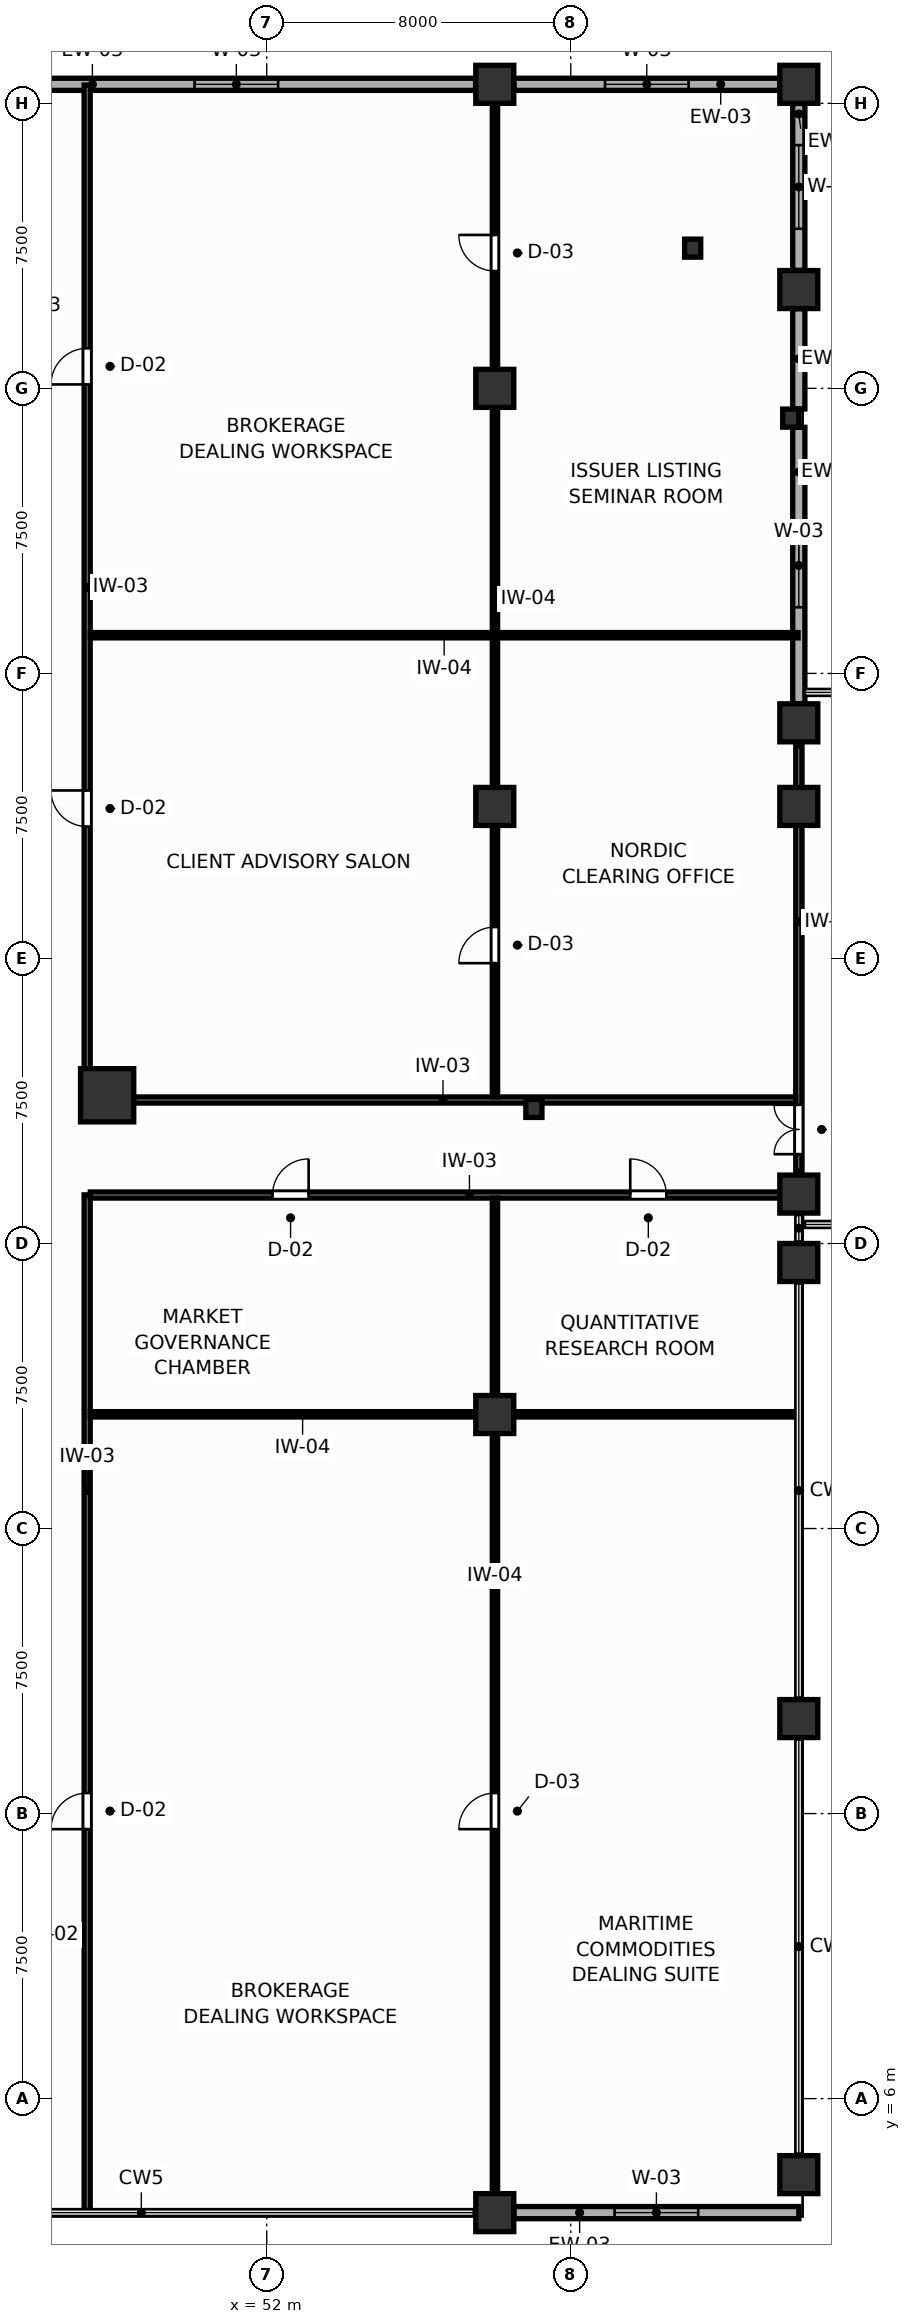
"""IFC4 building model, lengths in metres.
Left out: names, types, materials, properties, quantities, classifications, styles, units other than length and angle.
Written with IfcOpenShell. Run it as: python <this file> out.ifc"""

import sys

from ifc_helpers import new_model, si_unit, direction, frame, frame_2d, origin, origin_2d, place, context, subcontext, project, spatial, rectangle, i_section, extrude, source, transform, mapped, element, fill, save


model = new_model("IFC4")
c1 = context("Model", 3, precision=1e-05, world=origin(), true_north=direction((0.0, 1.0)))
c2 = subcontext(c1, "Body", "Model", "MODEL_VIEW")
j1 = project(units=[si_unit("LENGTHUNIT", "METRE"), si_unit("PLANEANGLEUNIT", "RADIAN")], contexts=[c1])
p1 = place(None, origin())
s1 = spatial("IfcSite", under=j1, at=p1, CompositionType="ELEMENT")
p2 = place(p1, origin())
s2 = spatial("IfcBuilding", under=s1, at=p2, CompositionType="ELEMENT")
p3 = place(p2, frame((0.0, 0.0, 4.8)))
s3 = spatial("IfcBuildingStorey", under=s2, at=p3, CompositionType="ELEMENT", Elevation=4.8)
m1 = source(origin(), c2, "Body", "SweptSolid", [
    extrude(rectangle(XDim=1.4, YDim=1.4, at=origin_2d()), origin(), (0.0, 0.0, 1.0), 4.8),
])
p4 = place(p3, frame((47.8, 32.4, 0.0), z_axis=(0.0, 0.0, 1.0), x_axis=(1.0, 0.0, 0.0)))
e1 = element("IfcColumn", 1, at=p4, inside=s3, PredefinedType="COLUMN", context=c2, shape_type="MappedRepresentation", body=[
    mapped(m1, transform((0.0, 0.0, 0.0), scale=1.0)),
])
m2 = source(origin(), c2, "Body", "SweptSolid", [
    extrude(rectangle(XDim=1.0, YDim=1.0, at=origin_2d()), origin(), (0.0, 0.0, 1.0), 4.8),
])
for number, where, z_axis, x_axis in (
    (2, (66.0, 4.0, 0.0), (0.0, 0.0, 1.0), (1.0, 0.0, 0.0)),
    (3, (66.0, 16.0, 0.0), (0.0, 0.0, 1.0), (1.0, 0.0, 0.0)),
    (4, (66.0, 28.0, 0.0), (0.0, 0.0, 1.0), (1.0, 0.0, 0.0)),
    (5, (66.0, 40.0, 0.0), (0.0, 0.0, 1.0), (1.0, 0.0, 0.0)),
    (6, (66.0, 53.6, 0.0), (0.0, 0.0, 1.0), (1.0, 0.0, 0.0)),
    (7, (66.0, 59.0, 0.0), (0.0, 0.0, 1.0), (1.0, 0.0, 0.0)),
    (8, (58.0, 3.0, 0.0), (0.0, 0.0, 1.0), (1.0, 0.0, 0.0)),
    (9, (58.0, 59.0, 0.0), (0.0, 0.0, 1.0), (1.0, 0.0, 0.0)),
    (10, (58.0, 24.0, 0.0), (0.0, 0.0, 1.0), (1.0, 0.0, 0.0)),
    (11, (58.0, 40.0, 0.0), (0.0, 0.0, 1.0), (1.0, 0.0, 0.0)),
    (12, (58.0, 51.0, 0.0), (0.0, 0.0, 1.0), (1.0, 0.0, 0.0)),
    (13, (66.0, 29.8, 0.0), (0.0, 0.0, 1.0), (1.0, 0.0, 0.0)),
    (14, (66.0, 42.2, 0.0), (0.0, 0.0, 1.0), (1.0, 0.0, 0.0)),
):
    element("IfcColumn", number, at=place(p3, frame(where, z_axis=z_axis, x_axis=x_axis)), inside=s3, PredefinedType="COLUMN", context=c2, shape_type="MappedRepresentation", body=[
        mapped(m2, transform((0.0, 0.0, 0.0), scale=1.0)),
    ])
m3 = source(origin(), c2, "Body", "SweptSolid", [
    extrude(i_section(OverallWidth=0.424, OverallDepth=0.474, WebThickness=0.045, FlangeThickness=0.072, FilletRadius=0.015, at=origin_2d()), origin(), (0.0, 0.0, 1.0), 4.8),
])
for number, where, z_axis, x_axis in (
    (15, (65.789, 50.217, 0.0), (0.0, 0.0, 1.0), (1.0, 0.0, 0.0)),
    (16, (63.207, 54.689, 0.0), (0.0, 0.0, 1.0), (1.0, 0.0, 0.0)),
    (17, (59.03, 32.054, 0.0), (0.0, 0.0, 1.0), (1.0, 0.0, 0.0)),
):
    element("IfcColumn", number, at=place(p3, frame(where, z_axis=z_axis, x_axis=x_axis)), inside=s3, PredefinedType="COLUMN", context=c2, shape_type="MappedRepresentation", body=[
        mapped(m3, transform((0.0, 0.0, 0.0), scale=1.0)),
    ])
p5 = place(p3, frame((58.505, 3.0, 0.0), z_axis=(0.0, 0.0, 1.0), x_axis=(1.0, 0.0, 0.0)))
e18 = element("IfcWall", 18, at=p5, inside=s3, PredefinedType="SOLIDWALL", context=c2, shape_type="SweptSolid", body=[
    extrude(rectangle(XDim=7.495, YDim=0.32, at=frame_2d((3.748, 0.0))), origin(), (0.0, 0.0, 1.0), 3.82),
])
p6 = place(p5, frame((2.647, 0.0, 0.75)))
e19 = element("IfcOpeningElement", 19, at=p6, cuts=e18, PredefinedType="OPENING", context=c2, shape_type="SweptSolid", body=[
    extrude(rectangle(XDim=2.2, YDim=2.0, at=frame_2d((1.1, 1.0))), frame((0.0, 0.17, 0.0), z_axis=(0.0, -1.0, 0.0), x_axis=(1.0, 0.0, 0.0)), (0.0, 0.0, 1.0), 0.34),
])
p7 = place(p3, frame((44.905, 59.0, 0.0), z_axis=(0.0, 0.0, 1.0), x_axis=(1.0, 0.0, 0.0)))
e20 = element("IfcWall", 20, at=p7, inside=s3, PredefinedType="SOLIDWALL", context=c2, shape_type="SweptSolid", body=[
    extrude(rectangle(XDim=12.59, YDim=0.32, at=frame_2d((6.295, 0.0))), origin(), (0.0, 0.0, 1.0), 3.82),
])
p8 = place(p7, frame((5.195, 0.0, 0.75)))
e21 = element("IfcOpeningElement", 21, at=p8, cuts=e20, PredefinedType="OPENING", context=c2, shape_type="SweptSolid", body=[
    extrude(rectangle(XDim=2.2, YDim=2.0, at=frame_2d((1.1, 1.0))), frame((0.0, 0.17, 0.0), z_axis=(0.0, -1.0, 0.0), x_axis=(1.0, 0.0, 0.0)), (0.0, 0.0, 1.0), 0.34),
])
p9 = place(p3, frame((58.505, 59.0, 0.0), z_axis=(0.0, 0.0, 1.0), x_axis=(1.0, 0.0, 0.0)))
e22 = element("IfcWall", 22, at=p9, inside=s3, PredefinedType="SOLIDWALL", context=c2, shape_type="SweptSolid", body=[
    extrude(rectangle(XDim=6.99, YDim=0.32, at=frame_2d((3.495, 0.0))), origin(), (0.0, 0.0, 1.0), 3.82),
])
p10 = place(p9, frame((2.395, 0.0, 0.75)))
e23 = element("IfcOpeningElement", 23, at=p10, cuts=e22, PredefinedType="OPENING", context=c2, shape_type="SweptSolid", body=[
    extrude(rectangle(XDim=2.2, YDim=2.0, at=frame_2d((1.1, 1.0))), frame((0.0, 0.17, 0.0), z_axis=(0.0, -1.0, 0.0), x_axis=(1.0, 0.0, 0.0)), (0.0, 0.0, 1.0), 0.34),
])
p11 = place(p3, frame((66.0, 42.705, 0.0), z_axis=(0.0, 0.0, 1.0), x_axis=(0.0, 1.0, 0.0)))
e24 = element("IfcWall", 24, at=p11, inside=s3, PredefinedType="SOLIDWALL", context=c2, shape_type="SweptSolid", body=[
    extrude(rectangle(XDim=7.27, YDim=0.32, at=frame_2d((3.635, 0.0))), origin(), (0.0, 0.0, 1.0), 3.82),
])
p12 = place(p11, frame((2.535, 0.0, 0.75)))
e25 = element("IfcOpeningElement", 25, at=p12, cuts=e24, PredefinedType="OPENING", context=c2, shape_type="SweptSolid", body=[
    extrude(rectangle(XDim=2.2, YDim=2.0, at=frame_2d((1.1, 1.0))), frame((0.0, 0.17, 0.0), z_axis=(0.0, -1.0, 0.0), x_axis=(1.0, 0.0, 0.0)), (0.0, 0.0, 1.0), 0.34),
])
p13 = place(p3, frame((66.0, 50.459, 0.0), z_axis=(0.0, 0.0, 1.0), x_axis=(0.0, 1.0, 0.0)))
e26 = element("IfcWall", 26, at=p13, inside=s3, PredefinedType="SOLIDWALL", context=c2, shape_type="SweptSolid", body=[
    extrude(rectangle(XDim=2.636, YDim=0.32, at=frame_2d((1.318, 0.0))), origin(), (0.0, 0.0, 1.0), 3.82),
])
p14 = place(p3, frame((66.0, 54.105, 0.0), z_axis=(0.0, 0.0, 1.0), x_axis=(0.0, 1.0, 0.0)))
e27 = element("IfcWall", 27, at=p14, inside=s3, PredefinedType="SOLIDWALL", context=c2, shape_type="SweptSolid", body=[
    extrude(rectangle(XDim=4.39, YDim=0.32, at=frame_2d((2.195, 0.0))), origin(), (0.0, 0.0, 1.0), 3.82),
])
p15 = place(p14, frame((1.095, 0.0, 0.75)))
e28 = element("IfcOpeningElement", 28, at=p15, cuts=e27, PredefinedType="OPENING", context=c2, shape_type="SweptSolid", body=[
    extrude(rectangle(XDim=2.2, YDim=2.0, at=frame_2d((1.1, 1.0))), frame((0.0, 0.17, 0.0), z_axis=(0.0, -1.0, 0.0), x_axis=(1.0, 0.0, 0.0)), (0.0, 0.0, 1.0), 0.34),
])
p16 = place(p3, frame((66.0, 30.4, 0.0), z_axis=(0.0, 0.0, 1.0), x_axis=(0.0, 1.0, 0.0)))
e29 = element("IfcWall", 29, at=p16, inside=s3, PredefinedType="PARTITIONING", context=c2, shape_type="SweptSolid", body=[
    extrude(rectangle(XDim=11.2, YDim=0.16, at=frame_2d((5.6, 0.0))), origin(), (0.0, 0.0, 1.0), 3.82),
])
p17 = place(p16, frame((0.45, 0.0, 0.0)))
e30 = element("IfcOpeningElement", 30, at=p17, cuts=e29, PredefinedType="OPENING", context=c2, shape_type="SweptSolid", body=[
    extrude(rectangle(XDim=1.3, YDim=2.1, at=frame_2d((0.65, 1.05))), frame((0.0, 0.09, 0.0), z_axis=(0.0, -1.0, 0.0), x_axis=(1.0, 0.0, 0.0)), (0.0, 0.0, 1.0), 0.18),
])
p18 = place(p3, frame((47.275, 3.02, 0.0), z_axis=(0.0, 0.0, 1.0), x_axis=(0.0, 1.0, 0.0)))
e31 = element("IfcWall", 31, at=p18, inside=s3, PredefinedType="PARTITIONING", context=c2, shape_type="SweptSolid", body=[
    extrude(rectangle(XDim=26.76, YDim=0.16, at=frame_2d((13.38, 0.0))), origin(), (0.0, 0.0, 1.0), 4.52),
])
p19 = place(p18, frame((10.07, 0.0, 0.0)))
e32 = element("IfcOpeningElement", 32, at=p19, cuts=e31, PredefinedType="OPENING", context=c2, shape_type="SweptSolid", body=[
    extrude(rectangle(XDim=0.95, YDim=2.05, at=frame_2d((0.475, 1.025))), frame((0.0, 0.09, 0.0), z_axis=(0.0, -1.0, 0.0), x_axis=(1.0, 0.0, 0.0)), (0.0, 0.0, 1.0), 0.18),
])
p20 = place(p3, frame((47.275, 32.27, 0.0), z_axis=(0.0, 0.0, 1.0), x_axis=(0.0, 1.0, 0.0)))
e33 = element("IfcWall", 33, at=p20, inside=s3, PredefinedType="PARTITIONING", context=c2, shape_type="SweptSolid", body=[
    extrude(rectangle(XDim=26.71, YDim=0.16, at=frame_2d((13.355, 0.0))), origin(), (0.0, 0.0, 1.0), 4.52),
])
p21 = place(p20, frame((7.2, 0.0, 0.0)))
e34 = element("IfcOpeningElement", 34, at=p21, cuts=e33, PredefinedType="OPENING", context=c2, shape_type="SweptSolid", body=[
    extrude(rectangle(XDim=0.95, YDim=2.05, at=frame_2d((0.475, 1.025))), frame((0.0, 0.09, 0.0), z_axis=(0.0, -1.0, 0.0), x_axis=(1.0, 0.0, 0.0)), (0.0, 0.0, 1.0), 0.18),
])
p22 = place(p20, frame((18.833, 0.0, 0.0)))
e35 = element("IfcOpeningElement", 35, at=p22, cuts=e33, PredefinedType="OPENING", context=c2, shape_type="SweptSolid", body=[
    extrude(rectangle(XDim=0.95, YDim=2.05, at=frame_2d((0.475, 1.025))), frame((0.0, 0.09, 0.0), z_axis=(0.0, -1.0, 0.0), x_axis=(1.0, 0.0, 0.0)), (0.0, 0.0, 1.0), 0.18),
])
p23 = place(p3, frame((47.357, 29.775, 0.0), z_axis=(0.0, 0.0, 1.0), x_axis=(1.0, 0.0, 0.0)))
e36 = element("IfcWall", 36, at=p23, inside=s3, PredefinedType="PARTITIONING", context=c2, shape_type="SweptSolid", body=[
    extrude(rectangle(XDim=18.623, YDim=0.16, at=frame_2d((9.312, 0.0))), origin(), (0.0, 0.0, 1.0), 4.52),
])
p24 = place(p23, frame((4.795, 0.0, 0.0)))
e37 = element("IfcOpeningElement", 37, at=p24, cuts=e36, PredefinedType="OPENING", context=c2, shape_type="SweptSolid", body=[
    extrude(rectangle(XDim=0.95, YDim=2.05, at=frame_2d((0.475, 1.025))), frame((0.0, 0.09, 0.0), z_axis=(0.0, -1.0, 0.0), x_axis=(1.0, 0.0, 0.0)), (0.0, 0.0, 1.0), 0.18),
])
p25 = place(p23, frame((14.208, 0.0, 0.0)))
e38 = element("IfcOpeningElement", 38, at=p25, cuts=e36, PredefinedType="OPENING", context=c2, shape_type="SweptSolid", body=[
    extrude(rectangle(XDim=0.95, YDim=2.05, at=frame_2d((0.475, 1.025))), frame((0.0, 0.09, 0.0), z_axis=(0.0, -1.0, 0.0), x_axis=(1.0, 0.0, 0.0)), (0.0, 0.0, 1.0), 0.18),
])
p26 = place(p3, frame((47.357, 32.275, 0.0), z_axis=(0.0, 0.0, 1.0), x_axis=(1.0, 0.0, 0.0)))
e39 = element("IfcWall", 39, at=p26, inside=s3, PredefinedType="PARTITIONING", context=c2, shape_type="SweptSolid", body=[
    extrude(rectangle(XDim=18.561, YDim=0.16, at=frame_2d((9.281, 0.0))), origin(), (0.0, 0.0, 1.0), 3.82),
])
p27 = place(p3, frame((58.005, 3.02, 0.0), z_axis=(0.0, 0.0, 1.0), x_axis=(0.0, 1.0, 0.0)))
e40 = element("IfcWall", 40, at=p27, inside=s3, PredefinedType="PARTITIONING", context=c2, shape_type="SweptSolid", body=[
    extrude(rectangle(XDim=26.673, YDim=0.14, at=frame_2d((13.336, 0.0))), origin(), (0.0, 0.0, 1.0), 3.82),
])
p28 = place(p27, frame((10.07, 0.0, 0.0)))
e41 = element("IfcOpeningElement", 41, at=p28, cuts=e40, PredefinedType="OPENING", context=c2, shape_type="SweptSolid", body=[
    extrude(rectangle(XDim=0.95, YDim=2.05, at=frame_2d((0.475, 1.025))), frame((0.0, 0.08, 0.0), z_axis=(0.0, -1.0, 0.0), x_axis=(1.0, 0.0, 0.0)), (0.0, 0.0, 1.0), 0.16),
])
p29 = place(p3, frame((58.005, 32.357, 0.0), z_axis=(0.0, 0.0, 1.0), x_axis=(0.0, 1.0, 0.0)))
e42 = element("IfcWall", 42, at=p29, inside=s3, PredefinedType="PARTITIONING", context=c2, shape_type="SweptSolid", body=[
    extrude(rectangle(XDim=26.623, YDim=0.14, at=frame_2d((13.312, 0.0))), origin(), (0.0, 0.0, 1.0), 3.82),
])
p30 = place(p29, frame((3.519, 0.0, 0.0)))
e43 = element("IfcOpeningElement", 43, at=p30, cuts=e42, PredefinedType="OPENING", context=c2, shape_type="SweptSolid", body=[
    extrude(rectangle(XDim=0.95, YDim=2.05, at=frame_2d((0.475, 1.025))), frame((0.0, 0.08, 0.0), z_axis=(0.0, -1.0, 0.0), x_axis=(1.0, 0.0, 0.0)), (0.0, 0.0, 1.0), 0.16),
])
p31 = place(p29, frame((21.73, 0.0, 0.0)))
e44 = element("IfcOpeningElement", 44, at=p31, cuts=e42, PredefinedType="OPENING", context=c2, shape_type="SweptSolid", body=[
    extrude(rectangle(XDim=0.95, YDim=2.05, at=frame_2d((0.475, 1.025))), frame((0.0, 0.08, 0.0), z_axis=(0.0, -1.0, 0.0), x_axis=(1.0, 0.0, 0.0)), (0.0, 0.0, 1.0), 0.16),
])
p32 = place(p3, frame((47.357, 24.005, 0.0), z_axis=(0.0, 0.0, 1.0), x_axis=(1.0, 0.0, 0.0)))
e45 = element("IfcWall", 45, at=p32, inside=s3, PredefinedType="PARTITIONING", context=c2, shape_type="SweptSolid", body=[
    extrude(rectangle(XDim=18.623, YDim=0.14, at=frame_2d((9.312, 0.0))), origin(), (0.0, 0.0, 1.0), 3.92),
])
p33 = place(p3, frame((47.357, 44.505, 0.0), z_axis=(0.0, 0.0, 1.0), x_axis=(1.0, 0.0, 0.0)))
e46 = element("IfcWall", 46, at=p33, inside=s3, PredefinedType="PARTITIONING", context=c2, shape_type="SweptSolid", body=[
    extrude(rectangle(XDim=18.623, YDim=0.14, at=frame_2d((9.312, 0.0))), origin(), (0.0, 0.0, 1.0), 4.52),
])
p34 = place(p6, origin())
e47 = element("IfcWindow", 47, at=p34, inside=s3, PartitioningType="SINGLE_PANEL", PredefinedType="WINDOW", context=c2, shape_type="SweptSolid", body=[
    extrude(rectangle(XDim=2.2, YDim=2.0, at=frame_2d((1.1, 1.0))), frame((0.0, 0.03, 0.0), z_axis=(0.0, -1.0, 0.0), x_axis=(1.0, 0.0, 0.0)), (0.0, 0.0, 1.0), 0.06),
])
fill(e19, e47)
p35 = place(p8, origin())
e48 = element("IfcWindow", 48, at=p35, inside=s3, PartitioningType="SINGLE_PANEL", PredefinedType="WINDOW", context=c2, shape_type="SweptSolid", body=[
    extrude(rectangle(XDim=2.2, YDim=2.0, at=frame_2d((1.1, 1.0))), frame((0.0, 0.03, 0.0), z_axis=(0.0, -1.0, 0.0), x_axis=(1.0, 0.0, 0.0)), (0.0, 0.0, 1.0), 0.06),
])
fill(e21, e48)
p36 = place(p10, origin())
e49 = element("IfcWindow", 49, at=p36, inside=s3, PartitioningType="SINGLE_PANEL", PredefinedType="WINDOW", context=c2, shape_type="SweptSolid", body=[
    extrude(rectangle(XDim=2.2, YDim=2.0, at=frame_2d((1.1, 1.0))), frame((0.0, 0.03, 0.0), z_axis=(0.0, -1.0, 0.0), x_axis=(1.0, 0.0, 0.0)), (0.0, 0.0, 1.0), 0.06),
])
fill(e23, e49)
p37 = place(p12, origin())
e50 = element("IfcWindow", 50, at=p37, inside=s3, PartitioningType="SINGLE_PANEL", PredefinedType="WINDOW", context=c2, shape_type="SweptSolid", body=[
    extrude(rectangle(XDim=2.2, YDim=2.0, at=frame_2d((1.1, 1.0))), frame((0.0, 0.03, 0.0), z_axis=(0.0, -1.0, 0.0), x_axis=(1.0, 0.0, 0.0)), (0.0, 0.0, 1.0), 0.06),
])
fill(e25, e50)
p38 = place(p15, origin())
e51 = element("IfcWindow", 51, at=p38, inside=s3, PartitioningType="SINGLE_PANEL", PredefinedType="WINDOW", context=c2, shape_type="SweptSolid", body=[
    extrude(rectangle(XDim=2.2, YDim=2.0, at=frame_2d((1.1, 1.0))), frame((0.0, 0.03, 0.0), z_axis=(0.0, -1.0, 0.0), x_axis=(1.0, 0.0, 0.0)), (0.0, 0.0, 1.0), 0.06),
])
fill(e28, e51)
p39 = place(p17, origin())
e52 = element("IfcDoor", 52, at=p39, inside=s3, OperationType="DOUBLE_DOOR_SINGLE_SWING", PredefinedType="DOOR", context=c2, shape_type="SweptSolid", body=[
    extrude(rectangle(XDim=1.3, YDim=2.1, at=frame_2d((0.65, 1.05))), frame((0.0, 0.025, 0.0), z_axis=(0.0, -1.0, 0.0), x_axis=(1.0, 0.0, 0.0)), (0.0, 0.0, 1.0), 0.05),
])
fill(e30, e52)
p40 = place(p19, origin())
e53 = element("IfcDoor", 53, at=p40, inside=s3, OperationType="SINGLE_SWING_LEFT", PredefinedType="DOOR", context=c2, shape_type="SweptSolid", body=[
    extrude(rectangle(XDim=0.95, YDim=2.05, at=frame_2d((0.475, 1.025))), frame((0.0, 0.025, 0.0), z_axis=(0.0, -1.0, 0.0), x_axis=(1.0, 0.0, 0.0)), (0.0, 0.0, 1.0), 0.05),
])
fill(e32, e53)
p41 = place(p21, origin())
e54 = element("IfcDoor", 54, at=p41, inside=s3, OperationType="SINGLE_SWING_RIGHT", PredefinedType="DOOR", context=c2, shape_type="SweptSolid", body=[
    extrude(rectangle(XDim=0.95, YDim=2.05, at=frame_2d((0.475, 1.025))), frame((0.0, 0.025, 0.0), z_axis=(0.0, -1.0, 0.0), x_axis=(1.0, 0.0, 0.0)), (0.0, 0.0, 1.0), 0.05),
])
fill(e34, e54)
p42 = place(p22, origin())
e55 = element("IfcDoor", 55, at=p42, inside=s3, OperationType="SINGLE_SWING_LEFT", PredefinedType="DOOR", context=c2, shape_type="SweptSolid", body=[
    extrude(rectangle(XDim=0.95, YDim=2.05, at=frame_2d((0.475, 1.025))), frame((0.0, 0.025, 0.0), z_axis=(0.0, -1.0, 0.0), x_axis=(1.0, 0.0, 0.0)), (0.0, 0.0, 1.0), 0.05),
])
fill(e35, e55)
p43 = place(p24, origin())
e56 = element("IfcDoor", 56, at=p43, inside=s3, OperationType="SINGLE_SWING_RIGHT", PredefinedType="DOOR", context=c2, shape_type="SweptSolid", body=[
    extrude(rectangle(XDim=0.95, YDim=2.05, at=frame_2d((0.475, 1.025))), frame((0.0, 0.025, 0.0), z_axis=(0.0, -1.0, 0.0), x_axis=(1.0, 0.0, 0.0)), (0.0, 0.0, 1.0), 0.05),
])
fill(e37, e56)
p44 = place(p25, origin())
e57 = element("IfcDoor", 57, at=p44, inside=s3, OperationType="SINGLE_SWING_LEFT", PredefinedType="DOOR", context=c2, shape_type="SweptSolid", body=[
    extrude(rectangle(XDim=0.95, YDim=2.05, at=frame_2d((0.475, 1.025))), frame((0.0, 0.025, 0.0), z_axis=(0.0, -1.0, 0.0), x_axis=(1.0, 0.0, 0.0)), (0.0, 0.0, 1.0), 0.05),
])
fill(e38, e57)
p45 = place(p28, origin())
e58 = element("IfcDoor", 58, at=p45, inside=s3, OperationType="SINGLE_SWING_LEFT", PredefinedType="DOOR", context=c2, shape_type="SweptSolid", body=[
    extrude(rectangle(XDim=0.95, YDim=2.05, at=frame_2d((0.475, 1.025))), frame((0.0, 0.025, 0.0), z_axis=(0.0, -1.0, 0.0), x_axis=(1.0, 0.0, 0.0)), (0.0, 0.0, 1.0), 0.05),
])
fill(e41, e58)
p46 = place(p30, origin())
e59 = element("IfcDoor", 59, at=p46, inside=s3, OperationType="SINGLE_SWING_LEFT", PredefinedType="DOOR", context=c2, shape_type="SweptSolid", body=[
    extrude(rectangle(XDim=0.95, YDim=2.05, at=frame_2d((0.475, 1.025))), frame((0.0, 0.025, 0.0), z_axis=(0.0, -1.0, 0.0), x_axis=(1.0, 0.0, 0.0)), (0.0, 0.0, 1.0), 0.05),
])
fill(e43, e59)
p47 = place(p31, origin())
e60 = element("IfcDoor", 60, at=p47, inside=s3, OperationType="SINGLE_SWING_RIGHT", PredefinedType="DOOR", context=c2, shape_type="SweptSolid", body=[
    extrude(rectangle(XDim=0.95, YDim=2.05, at=frame_2d((0.475, 1.025))), frame((0.0, 0.025, 0.0), z_axis=(0.0, -1.0, 0.0), x_axis=(1.0, 0.0, 0.0)), (0.0, 0.0, 1.0), 0.05),
])
fill(e44, e60)
save(model, sys.argv[1])
